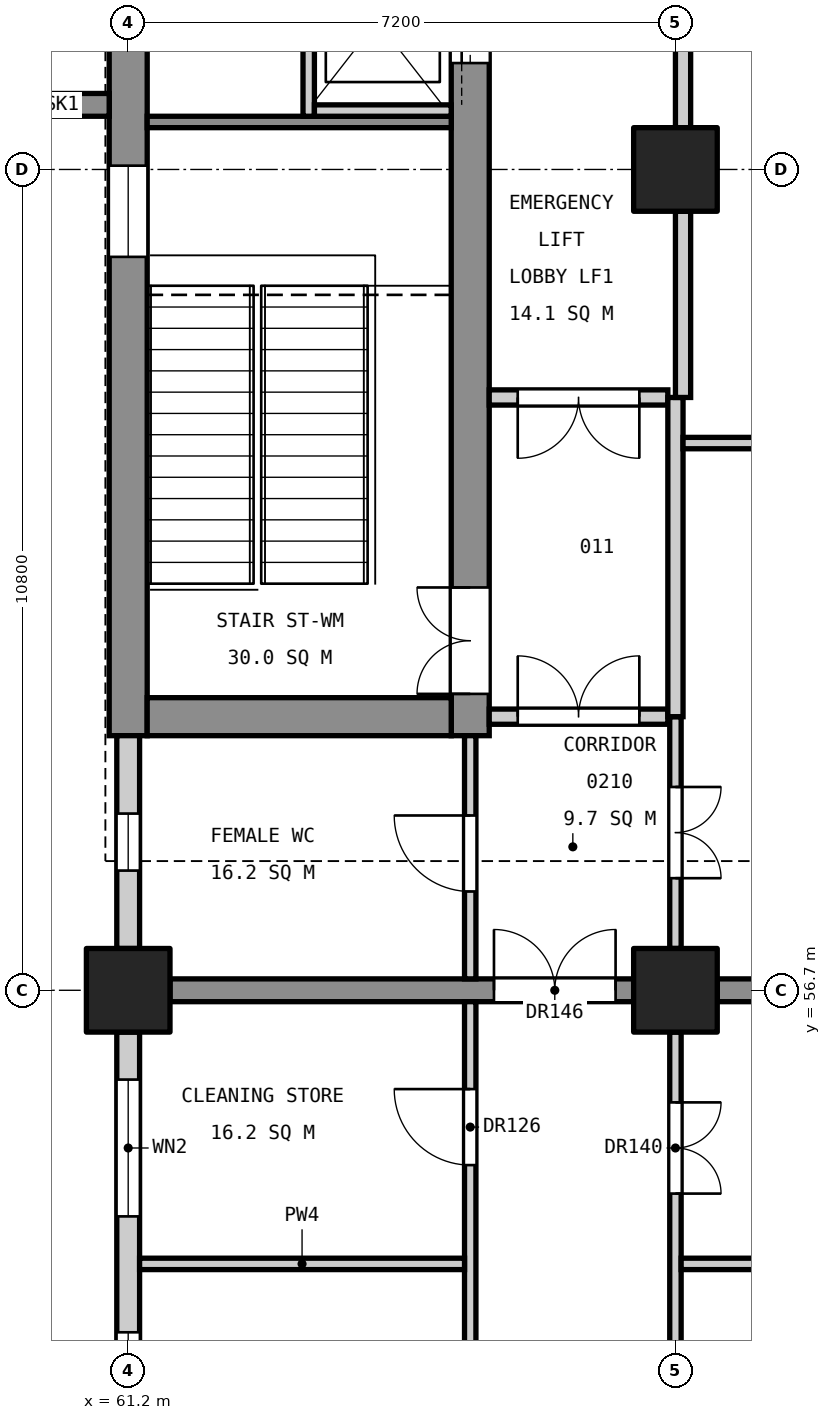
"""IFC4 building model, lengths in metres.
Left out: names, types, materials, properties, quantities, classifications, styles, units other than length and angle.
Written with IfcOpenShell. Run it as: python <this file> out.ifc"""

import sys

from ifc_helpers import new_model, si_unit, direction, frame, frame_2d, origin, origin_2d, place, context, subcontext, project, spatial, rectangle, extrude, element, fill, save


model = new_model("IFC4")
c1 = context("Model", 3, precision=1e-05, world=origin(), true_north=direction((0.0, 1.0)))
c2 = subcontext(c1, "Body", "Model", "MODEL_VIEW")
j1 = project(units=[si_unit("LENGTHUNIT", "METRE"), si_unit("PLANEANGLEUNIT", "RADIAN")], contexts=[c1])
p1 = place(None, origin())
s1 = spatial("IfcSite", under=j1, at=p1, CompositionType="ELEMENT")
p2 = place(p1, origin())
s2 = spatial("IfcBuilding", under=s1, at=p2, CompositionType="ELEMENT")
p3 = place(p2, frame((0.0, 0.0, 11.4)))
s3 = spatial("IfcBuildingStorey", under=s2, at=p3, CompositionType="ELEMENT", Elevation=11.4)
for number, where, z_axis, x_axis in (
    (1, (61.2, 56.7, 0.0), (0.0, 0.0, 1.0), (1.0, 0.0, 0.0)),
    (2, (68.4, 56.7, 0.0), (0.0, 0.0, 1.0), (1.0, 0.0, 0.0)),
    (3, (68.4, 67.5, 0.0), (0.0, 0.0, 1.0), (1.0, 0.0, 0.0)),
):
    element("IfcColumn", number, at=place(p3, frame(where, z_axis=z_axis, x_axis=x_axis)), inside=s3, PredefinedType="COLUMN", context=c2, shape_type="SweptSolid", body=[
        extrude(rectangle(XDim=1.1, YDim=1.1, at=origin_2d()), origin(), (0.0, 0.0, 1.0), 5.4),
    ])
p4 = place(p3, frame((61.2, 60.05, 0.0), z_axis=(0.0, 0.0, 1.0), x_axis=(0.0, 1.0, 0.0)))
e4 = element("IfcWall", 4, at=p4, inside=s3, PredefinedType="SHEAR", context=c2, shape_type="SweptSolid", body=[
    extrude(rectangle(XDim=14.9, YDim=0.5, at=frame_2d((7.45, 0.0))), origin(), (0.0, 0.0, 1.0), 5.1),
])
p5 = place(p4, frame((6.3, 0.0, 3.4)))
e5 = element("IfcOpeningElement", 5, at=p5, cuts=e4, PredefinedType="OPENING", context=c2, shape_type="SweptSolid", body=[
    extrude(rectangle(XDim=1.2, YDim=0.9, at=frame_2d((0.6, 0.45))), frame((0.0, 0.26, 0.0), z_axis=(0.0, -1.0, 0.0), x_axis=(1.0, 0.0, 0.0)), (0.0, 0.0, 1.0), 0.52),
])
p6 = place(p3, frame((65.7, 60.05, 0.0), z_axis=(0.0, 0.0, 1.0), x_axis=(0.0, 1.0, 0.0)))
e6 = element("IfcWall", 6, at=p6, inside=s3, PredefinedType="SHEAR", context=c2, shape_type="SweptSolid", body=[
    extrude(rectangle(XDim=14.9, YDim=0.5, at=frame_2d((7.45, 0.0))), origin(), (0.0, 0.0, 1.0), 5.1),
])
p7 = place(p6, frame((0.55, 0.0, 0.0)))
e7 = element("IfcOpeningElement", 7, at=p7, cuts=e6, PredefinedType="OPENING", context=c2, shape_type="SweptSolid", body=[
    extrude(rectangle(XDim=1.4, YDim=2.1, at=frame_2d((0.7, 1.05))), frame((0.0, 0.26, 0.0), z_axis=(0.0, -1.0, 0.0), x_axis=(1.0, 0.0, 0.0)), (0.0, 0.0, 1.0), 0.52),
])
p8 = place(p6, frame((8.85, 0.0, 0.0)))
e8 = element("IfcOpeningElement", 8, at=p8, cuts=e6, PredefinedType="OPENING", context=c2, shape_type="SweptSolid", body=[
    extrude(rectangle(XDim=1.1, YDim=2.1, at=frame_2d((0.55, 1.05))), frame((0.0, 0.26, 0.0), z_axis=(0.0, -1.0, 0.0), x_axis=(1.0, 0.0, 0.0)), (0.0, 0.0, 1.0), 0.52),
])
p9 = place(p6, frame((11.4, 0.0, 0.0)))
e9 = element("IfcOpeningElement", 9, at=p9, cuts=e6, PredefinedType="OPENING", context=c2, shape_type="SweptSolid", body=[
    extrude(rectangle(XDim=1.1, YDim=2.1, at=frame_2d((0.55, 1.05))), frame((0.0, 0.26, 0.0), z_axis=(0.0, -1.0, 0.0), x_axis=(1.0, 0.0, 0.0)), (0.0, 0.0, 1.0), 0.52),
])
p10 = place(p3, frame((61.45, 60.3, 0.0), z_axis=(0.0, 0.0, 1.0), x_axis=(1.0, 0.0, 0.0)))
e10 = element("IfcWall", 10, at=p10, inside=s3, PredefinedType="SHEAR", context=c2, shape_type="SweptSolid", body=[
    extrude(rectangle(XDim=4.0, YDim=0.5, at=frame_2d((2.0, 0.0))), origin(), (0.0, 0.0, 1.0), 5.1),
])
p11 = place(p3, frame((60.95, 68.35, 0.0), z_axis=(0.0, 0.0, 1.0), x_axis=(-1.0, 0.0, 0.0)))
e11 = element("IfcWall", 11, at=p11, inside=s3, PredefinedType="SHEAR", context=c2, shape_type="SweptSolid", body=[
    extrude(rectangle(XDim=1.25, YDim=0.3, at=frame_2d((0.625, 0.0))), origin(), (0.0, 0.0, 1.0), 5.4),
])
p12 = place(p3, frame((61.75, 56.7, 0.0), z_axis=(0.0, 0.0, 1.0), x_axis=(1.0, 0.0, 0.0)))
e12 = element("IfcWall", 12, at=p12, inside=s3, PredefinedType="SHEAR", context=c2, shape_type="SweptSolid", body=[
    extrude(rectangle(XDim=6.1, YDim=0.3, at=frame_2d((3.05, 0.0))), origin(), (0.0, 0.0, 1.0), 5.1),
])
p13 = place(p12, frame((4.262, 0.0, 0.0)))
e13 = element("IfcOpeningElement", 13, at=p13, cuts=e12, PredefinedType="OPENING", context=c2, shape_type="SweptSolid", body=[
    extrude(rectangle(XDim=1.6, YDim=2.1, at=frame_2d((0.8, 1.05))), frame((0.0, 0.16, 0.0), z_axis=(0.0, -1.0, 0.0), x_axis=(1.0, 0.0, 0.0)), (0.0, 0.0, 1.0), 0.32),
])
p14 = place(p3, frame((68.95, 56.7, 0.0), z_axis=(0.0, 0.0, 1.0), x_axis=(1.0, 0.0, 0.0)))
e14 = element("IfcWall", 14, at=p14, inside=s3, PredefinedType="SHEAR", context=c2, shape_type="SweptSolid", body=[
    extrude(rectangle(XDim=9.7, YDim=0.3, at=frame_2d((4.85, 0.0))), origin(), (0.0, 0.0, 1.0), 5.1),
])
p15 = place(p3, frame((61.45, 68.125, 0.0), z_axis=(0.0, 0.0, 1.0), x_axis=(1.0, 0.0, 0.0)))
e15 = element("IfcWall", 15, at=p15, inside=s3, PredefinedType="SOLIDWALL", context=c2, shape_type="SweptSolid", body=[
    extrude(rectangle(XDim=4.0, YDim=0.15, at=frame_2d((2.0, 0.0))), origin(), (0.0, 0.0, 1.0), 5.1),
])
p16 = place(p3, frame((63.575, 68.2, 0.0), z_axis=(0.0, 0.0, 1.0), x_axis=(0.0, 1.0, 0.0)))
e16 = element("IfcWall", 16, at=p16, inside=s3, PredefinedType="SOLIDWALL", context=c2, shape_type="SweptSolid", body=[
    extrude(rectangle(XDim=2.5, YDim=0.15, at=frame_2d((1.25, 0.0))), origin(), (0.0, 0.0, 1.0), 5.4),
])
p17 = place(p3, frame((63.65, 68.275, 0.0), z_axis=(0.0, 0.0, 1.0), x_axis=(1.0, 0.0, 0.0)))
e17 = element("IfcWall", 17, at=p17, inside=s3, PredefinedType="SOLIDWALL", context=c2, shape_type="SweptSolid", body=[
    extrude(rectangle(XDim=1.8, YDim=0.15, at=frame_2d((0.9, 0.0))), origin(), (0.0, 0.0, 1.0), 5.4),
])
p18 = place(p3, frame((61.2, 46.15, 0.0), z_axis=(0.0, 0.0, 1.0), x_axis=(0.0, 1.0, 0.0)))
e18 = element("IfcWall", 18, at=p18, inside=s3, PredefinedType="STANDARD", context=c2, shape_type="SweptSolid", body=[
    extrude(rectangle(XDim=10.0, YDim=0.3, at=frame_2d((5.0, 0.0))), origin(), (0.0, 0.0, 1.0), 4.1),
])
p19 = place(p18, frame((1.3, 0.0, 0.8)))
e19 = element("IfcOpeningElement", 19, at=p19, cuts=e18, PredefinedType="OPENING", context=c2, shape_type="SweptSolid", body=[
    extrude(rectangle(XDim=0.75, YDim=1.2, at=frame_2d((0.375, 0.6))), frame((0.0, 0.16, 0.0), z_axis=(0.0, -1.0, 0.0), x_axis=(1.0, 0.0, 0.0)), (0.0, 0.0, 1.0), 0.32),
])
p20 = place(p18, frame((4.25, 0.0, 0.9)))
e20 = element("IfcOpeningElement", 20, at=p20, cuts=e18, PredefinedType="OPENING", context=c2, shape_type="SweptSolid", body=[
    extrude(rectangle(XDim=1.8, YDim=3.0, at=frame_2d((0.9, 1.5))), frame((0.0, 0.16, 0.0), z_axis=(0.0, -1.0, 0.0), x_axis=(1.0, 0.0, 0.0)), (0.0, 0.0, 1.0), 0.32),
])
p21 = place(p18, frame((7.575, 0.0, 0.9)))
e21 = element("IfcOpeningElement", 21, at=p21, cuts=e18, PredefinedType="OPENING", context=c2, shape_type="SweptSolid", body=[
    extrude(rectangle(XDim=1.8, YDim=3.0, at=frame_2d((0.9, 1.5))), frame((0.0, 0.16, 0.0), z_axis=(0.0, -1.0, 0.0), x_axis=(1.0, 0.0, 0.0)), (0.0, 0.0, 1.0), 0.32),
])
p22 = place(p3, frame((61.2, 57.25, 0.0), z_axis=(0.0, 0.0, 1.0), x_axis=(0.0, 1.0, 0.0)))
e22 = element("IfcWall", 22, at=p22, inside=s3, PredefinedType="STANDARD", context=c2, shape_type="SweptSolid", body=[
    extrude(rectangle(XDim=2.8, YDim=0.3, at=frame_2d((1.4, 0.0))), origin(), (0.0, 0.0, 1.0), 4.1),
])
p23 = place(p22, frame((1.025, 0.0, 0.8)))
e23 = element("IfcOpeningElement", 23, at=p23, cuts=e22, PredefinedType="OPENING", context=c2, shape_type="SweptSolid", body=[
    extrude(rectangle(XDim=0.75, YDim=1.2, at=frame_2d((0.375, 0.6))), frame((0.0, 0.16, 0.0), z_axis=(0.0, -1.0, 0.0), x_axis=(1.0, 0.0, 0.0)), (0.0, 0.0, 1.0), 0.32),
])
p24 = place(p3, frame((65.7, 46.15, 0.0), z_axis=(0.0, 0.0, 1.0), x_axis=(0.0, 1.0, 0.0)))
e24 = element("IfcWall", 24, at=p24, inside=s3, PredefinedType="PARTITIONING", context=c2, shape_type="SweptSolid", body=[
    extrude(rectangle(XDim=10.4, YDim=0.15, at=frame_2d((5.2, 0.0))), origin(), (0.0, 0.0, 1.0), 4.0),
])
p25 = place(p24, frame((4.65, 0.0, 0.0)))
e25 = element("IfcOpeningElement", 25, at=p25, cuts=e24, PredefinedType="OPENING", context=c2, shape_type="SweptSolid", body=[
    extrude(rectangle(XDim=1.0, YDim=2.1, at=frame_2d((0.5, 1.05))), frame((0.0, 0.085, 0.0), z_axis=(0.0, -1.0, 0.0), x_axis=(1.0, 0.0, 0.0)), (0.0, 0.0, 1.0), 0.17),
])
p26 = place(p24, frame((8.25, 0.0, 0.0)))
e26 = element("IfcOpeningElement", 26, at=p26, cuts=e24, PredefinedType="OPENING", context=c2, shape_type="SweptSolid", body=[
    extrude(rectangle(XDim=1.0, YDim=2.1, at=frame_2d((0.5, 1.05))), frame((0.0, 0.085, 0.0), z_axis=(0.0, -1.0, 0.0), x_axis=(1.0, 0.0, 0.0)), (0.0, 0.0, 1.0), 0.17),
])
p27 = place(p24, frame((1.05, 0.0, 0.0)))
e27 = element("IfcOpeningElement", 27, at=p27, cuts=e24, PredefinedType="OPENING", context=c2, shape_type="SweptSolid", body=[
    extrude(rectangle(XDim=1.0, YDim=2.1, at=frame_2d((0.5, 1.05))), frame((0.0, 0.085, 0.0), z_axis=(0.0, -1.0, 0.0), x_axis=(1.0, 0.0, 0.0)), (0.0, 0.0, 1.0), 0.17),
])
p28 = place(p3, frame((65.7, 56.85, 0.0), z_axis=(0.0, 0.0, 1.0), x_axis=(0.0, 1.0, 0.0)))
e28 = element("IfcWall", 28, at=p28, inside=s3, PredefinedType="PARTITIONING", context=c2, shape_type="SweptSolid", body=[
    extrude(rectangle(XDim=3.2, YDim=0.15, at=frame_2d((1.6, 0.0))), origin(), (0.0, 0.0, 1.0), 4.0),
])
p29 = place(p28, frame((1.15, 0.0, 0.0)))
e29 = element("IfcOpeningElement", 29, at=p29, cuts=e28, PredefinedType="OPENING", context=c2, shape_type="SweptSolid", body=[
    extrude(rectangle(XDim=1.0, YDim=2.1, at=frame_2d((0.5, 1.05))), frame((0.0, 0.085, 0.0), z_axis=(0.0, -1.0, 0.0), x_axis=(1.0, 0.0, 0.0)), (0.0, 0.0, 1.0), 0.17),
])
p30 = place(p3, frame((61.35, 53.1, 0.0), z_axis=(0.0, 0.0, 1.0), x_axis=(1.0, 0.0, 0.0)))
e30 = element("IfcWall", 30, at=p30, inside=s3, PredefinedType="PARTITIONING", context=c2, shape_type="SweptSolid", body=[
    extrude(rectangle(XDim=4.275, YDim=0.15, at=frame_2d((2.137, 0.0))), origin(), (0.0, 0.0, 1.0), 4.3),
])
p31 = place(p3, frame((65.95, 60.3, 0.0), z_axis=(0.0, 0.0, 1.0), x_axis=(1.0, 0.0, 0.0)))
e31 = element("IfcWall", 31, at=p31, inside=s3, PredefinedType="PARTITIONING", context=c2, shape_type="SweptSolid", body=[
    extrude(rectangle(XDim=2.35, YDim=0.2, at=frame_2d((1.175, 0.0))), origin(), (0.0, 0.0, 1.0), 4.3),
])
p32 = place(p31, frame((0.375, 0.0, 0.0)))
e32 = element("IfcOpeningElement", 32, at=p32, cuts=e31, PredefinedType="OPENING", context=c2, shape_type="SweptSolid", body=[
    extrude(rectangle(XDim=1.6, YDim=2.1, at=frame_2d((0.8, 1.05))), frame((0.0, 0.11, 0.0), z_axis=(0.0, -1.0, 0.0), x_axis=(1.0, 0.0, 0.0)), (0.0, 0.0, 1.0), 0.22),
])
p33 = place(p3, frame((65.95, 64.5, 0.0), z_axis=(0.0, 0.0, 1.0), x_axis=(1.0, 0.0, 0.0)))
e33 = element("IfcWall", 33, at=p33, inside=s3, PredefinedType="PARTITIONING", context=c2, shape_type="SweptSolid", body=[
    extrude(rectangle(XDim=2.35, YDim=0.2, at=frame_2d((1.175, 0.0))), origin(), (0.0, 0.0, 1.0), 4.0),
])
p34 = place(p33, frame((0.375, 0.0, 0.0)))
e34 = element("IfcOpeningElement", 34, at=p34, cuts=e33, PredefinedType="OPENING", context=c2, shape_type="SweptSolid", body=[
    extrude(rectangle(XDim=1.6, YDim=2.1, at=frame_2d((0.8, 1.05))), frame((0.0, 0.11, 0.0), z_axis=(0.0, -1.0, 0.0), x_axis=(1.0, 0.0, 0.0)), (0.0, 0.0, 1.0), 0.22),
])
p35 = place(p3, frame((68.4, 46.45, 0.0), z_axis=(0.0, 0.0, 1.0), x_axis=(0.0, 1.0, 0.0)))
e35 = element("IfcWall", 35, at=p35, inside=s3, PredefinedType="PARTITIONING", context=c2, shape_type="SweptSolid", body=[
    extrude(rectangle(XDim=9.7, YDim=0.15, at=frame_2d((4.85, 0.0))), origin(), (0.0, 0.0, 1.0), 4.0),
])
p36 = place(p35, frame((4.25, 0.0, 0.0)))
e36 = element("IfcOpeningElement", 36, at=p36, cuts=e35, PredefinedType="OPENING", context=c2, shape_type="SweptSolid", body=[
    extrude(rectangle(XDim=1.2, YDim=2.1, at=frame_2d((0.6, 1.05))), frame((0.0, 0.085, 0.0), z_axis=(0.0, -1.0, 0.0), x_axis=(1.0, 0.0, 0.0)), (0.0, 0.0, 1.0), 0.17),
])
p37 = place(p35, frame((0.925, 0.0, 0.0)))
e37 = element("IfcOpeningElement", 37, at=p37, cuts=e35, PredefinedType="OPENING", context=c2, shape_type="SweptSolid", body=[
    extrude(rectangle(XDim=1.2, YDim=2.1, at=frame_2d((0.6, 1.05))), frame((0.0, 0.085, 0.0), z_axis=(0.0, -1.0, 0.0), x_axis=(1.0, 0.0, 0.0)), (0.0, 0.0, 1.0), 0.17),
])
p38 = place(p35, frame((7.575, 0.0, 0.0)))
e38 = element("IfcOpeningElement", 38, at=p38, cuts=e35, PredefinedType="OPENING", context=c2, shape_type="SweptSolid", body=[
    extrude(rectangle(XDim=1.2, YDim=2.1, at=frame_2d((0.6, 1.05))), frame((0.0, 0.085, 0.0), z_axis=(0.0, -1.0, 0.0), x_axis=(1.0, 0.0, 0.0)), (0.0, 0.0, 1.0), 0.17),
])
p39 = place(p3, frame((68.4, 57.25, 0.0), z_axis=(0.0, 0.0, 1.0), x_axis=(0.0, 1.0, 0.0)))
e39 = element("IfcWall", 39, at=p39, inside=s3, PredefinedType="PARTITIONING", context=c2, shape_type="SweptSolid", body=[
    extrude(rectangle(XDim=3.05, YDim=0.15, at=frame_2d((1.525, 0.0))), origin(), (0.0, 0.0, 1.0), 4.0),
])
p40 = place(p39, frame((0.925, 0.0, 0.0)))
e40 = element("IfcOpeningElement", 40, at=p40, cuts=e39, PredefinedType="OPENING", context=c2, shape_type="SweptSolid", body=[
    extrude(rectangle(XDim=1.2, YDim=2.1, at=frame_2d((0.6, 1.05))), frame((0.0, 0.085, 0.0), z_axis=(0.0, -1.0, 0.0), x_axis=(1.0, 0.0, 0.0)), (0.0, 0.0, 1.0), 0.17),
])
p41 = place(p3, frame((68.4, 60.3, 0.0), z_axis=(0.0, 0.0, 1.0), x_axis=(0.0, 1.0, 0.0)))
e41 = element("IfcWall", 41, at=p41, inside=s3, PredefinedType="PARTITIONING", context=c2, shape_type="SweptSolid", body=[
    extrude(rectangle(XDim=4.2, YDim=0.2, at=frame_2d((2.1, 0.0))), origin(), (0.0, 0.0, 1.0), 4.0),
])
p42 = place(p3, frame((68.5, 64.5, 0.0), z_axis=(0.0, 0.0, 1.0), x_axis=(0.0, 1.0, 0.0)))
e42 = element("IfcWall", 42, at=p42, inside=s3, PredefinedType="PARTITIONING", context=c2, shape_type="SweptSolid", body=[
    extrude(rectangle(XDim=2.45, YDim=0.2, at=frame_2d((1.225, 0.0))), origin(), (0.0, 0.0, 1.0), 4.0),
])
p43 = place(p3, frame((68.5, 68.05, 0.0), z_axis=(0.0, 0.0, 1.0), x_axis=(0.0, 1.0, 0.0)))
e43 = element("IfcWall", 43, at=p43, inside=s3, PredefinedType="PARTITIONING", context=c2, shape_type="SweptSolid", body=[
    extrude(rectangle(XDim=2.75, YDim=0.2, at=frame_2d((1.375, 0.0))), origin(), (0.0, 0.0, 1.0), 4.0),
])
p44 = place(p3, frame((68.475, 53.1, 0.0), z_axis=(0.0, 0.0, 1.0), x_axis=(1.0, 0.0, 0.0)))
e44 = element("IfcWall", 44, at=p44, inside=s3, PredefinedType="PARTITIONING", context=c2, shape_type="SweptSolid", body=[
    extrude(rectangle(XDim=10.575, YDim=0.15, at=frame_2d((5.288, 0.0))), origin(), (0.0, 0.0, 1.0), 4.3),
])
p45 = place(p3, frame((68.5, 63.9, 0.0), z_axis=(0.0, 0.0, 1.0), x_axis=(1.0, 0.0, 0.0)))
e45 = element("IfcWall", 45, at=p45, inside=s3, PredefinedType="PARTITIONING", context=c2, shape_type="SweptSolid", body=[
    extrude(rectangle(XDim=10.55, YDim=0.15, at=frame_2d((5.275, 0.0))), origin(), (0.0, 0.0, 1.0), 4.3),
])
p46 = place(p7, origin())
e46 = element("IfcDoor", 46, at=p46, inside=s3, OperationType="DOUBLE_DOOR_SINGLE_SWING", PredefinedType="DOOR", context=c2, shape_type="SweptSolid", body=[
    extrude(rectangle(XDim=1.4, YDim=2.1, at=frame_2d((0.7, 1.05))), frame((0.0, 0.025, 0.0), z_axis=(0.0, -1.0, 0.0), x_axis=(1.0, 0.0, 0.0)), (0.0, 0.0, 1.0), 0.05),
])
fill(e7, e46)
p47 = place(p8, origin())
e47 = element("IfcDoor", 47, at=p47, inside=s3, OperationType="SLIDING_TO_LEFT", PredefinedType="DOOR", context=c2, shape_type="SweptSolid", body=[
    extrude(rectangle(XDim=1.1, YDim=2.1, at=frame_2d((0.55, 1.05))), frame((0.0, 0.025, 0.0), z_axis=(0.0, -1.0, 0.0), x_axis=(1.0, 0.0, 0.0)), (0.0, 0.0, 1.0), 0.05),
])
fill(e8, e47)
p48 = place(p20, origin())
e48 = element("IfcWindow", 48, at=p48, inside=s3, PartitioningType="SINGLE_PANEL", PredefinedType="WINDOW", context=c2, shape_type="SweptSolid", body=[
    extrude(rectangle(XDim=1.8, YDim=3.0, at=frame_2d((0.9, 1.5))), frame((0.0, 0.03, 0.0), z_axis=(0.0, -1.0, 0.0), x_axis=(1.0, 0.0, 0.0)), (0.0, 0.0, 1.0), 0.06),
])
fill(e20, e48)
p49 = place(p21, origin())
e49 = element("IfcWindow", 49, at=p49, inside=s3, PartitioningType="SINGLE_PANEL", PredefinedType="WINDOW", context=c2, shape_type="SweptSolid", body=[
    extrude(rectangle(XDim=1.8, YDim=3.0, at=frame_2d((0.9, 1.5))), frame((0.0, 0.03, 0.0), z_axis=(0.0, -1.0, 0.0), x_axis=(1.0, 0.0, 0.0)), (0.0, 0.0, 1.0), 0.06),
])
fill(e21, e49)
p50 = place(p23, origin())
e50 = element("IfcWindow", 50, at=p50, inside=s3, PartitioningType="SINGLE_PANEL", PredefinedType="WINDOW", context=c2, shape_type="SweptSolid", body=[
    extrude(rectangle(XDim=0.75, YDim=1.2, at=frame_2d((0.375, 0.6))), frame((0.0, 0.03, 0.0), z_axis=(0.0, -1.0, 0.0), x_axis=(1.0, 0.0, 0.0)), (0.0, 0.0, 1.0), 0.06),
])
fill(e23, e50)
p51 = place(p5, origin())
e51 = element("IfcWindow", 51, at=p51, inside=s3, PartitioningType="SINGLE_PANEL", PredefinedType="WINDOW", context=c2, shape_type="SweptSolid", body=[
    extrude(rectangle(XDim=1.2, YDim=0.9, at=frame_2d((0.6, 0.45))), frame((0.0, 0.03, 0.0), z_axis=(0.0, -1.0, 0.0), x_axis=(1.0, 0.0, 0.0)), (0.0, 0.0, 1.0), 0.06),
])
fill(e5, e51)
p52 = place(p26, origin())
e52 = element("IfcDoor", 52, at=p52, inside=s3, OperationType="SINGLE_SWING_RIGHT", PredefinedType="DOOR", context=c2, shape_type="SweptSolid", body=[
    extrude(rectangle(XDim=1.0, YDim=2.1, at=frame_2d((0.5, 1.05))), frame((0.0, 0.025, 0.0), z_axis=(0.0, -1.0, 0.0), x_axis=(1.0, 0.0, 0.0)), (0.0, 0.0, 1.0), 0.05),
])
fill(e26, e52)
p53 = place(p29, origin())
e53 = element("IfcDoor", 53, at=p53, inside=s3, OperationType="SINGLE_SWING_RIGHT", PredefinedType="DOOR", context=c2, shape_type="SweptSolid", body=[
    extrude(rectangle(XDim=1.0, YDim=2.1, at=frame_2d((0.5, 1.05))), frame((0.0, 0.025, 0.0), z_axis=(0.0, -1.0, 0.0), x_axis=(1.0, 0.0, 0.0)), (0.0, 0.0, 1.0), 0.05),
])
fill(e29, e53)
p54 = place(p40, frame((1.2, 0.0, 0.0), z_axis=(0.0, 0.0, 1.0), x_axis=(-1.0, 0.0, 0.0)))
e54 = element("IfcDoor", 54, at=p54, inside=s3, OperationType="DOUBLE_DOOR_SINGLE_SWING", PredefinedType="DOOR", context=c2, shape_type="SweptSolid", body=[
    extrude(rectangle(XDim=1.2, YDim=2.1, at=frame_2d((0.6, 1.05))), frame((0.0, 0.025, 0.0), z_axis=(0.0, -1.0, 0.0), x_axis=(1.0, 0.0, 0.0)), (0.0, 0.0, 1.0), 0.05),
])
fill(e40, e54)
p55 = place(p38, frame((1.2, 0.0, 0.0), z_axis=(0.0, 0.0, 1.0), x_axis=(-1.0, 0.0, 0.0)))
e55 = element("IfcDoor", 55, at=p55, inside=s3, OperationType="DOUBLE_DOOR_SINGLE_SWING", PredefinedType="DOOR", context=c2, shape_type="SweptSolid", body=[
    extrude(rectangle(XDim=1.2, YDim=2.1, at=frame_2d((0.6, 1.05))), frame((0.0, 0.025, 0.0), z_axis=(0.0, -1.0, 0.0), x_axis=(1.0, 0.0, 0.0)), (0.0, 0.0, 1.0), 0.05),
])
fill(e38, e55)
p56 = place(p32, origin())
e56 = element("IfcDoor", 56, at=p56, inside=s3, OperationType="DOUBLE_DOOR_SINGLE_SWING", PredefinedType="DOOR", context=c2, shape_type="SweptSolid", body=[
    extrude(rectangle(XDim=1.6, YDim=2.1, at=frame_2d((0.8, 1.05))), frame((0.0, 0.025, 0.0), z_axis=(0.0, -1.0, 0.0), x_axis=(1.0, 0.0, 0.0)), (0.0, 0.0, 1.0), 0.05),
])
fill(e32, e56)
p57 = place(p34, frame((1.6, 0.0, 0.0), z_axis=(0.0, 0.0, 1.0), x_axis=(-1.0, 0.0, 0.0)))
e57 = element("IfcDoor", 57, at=p57, inside=s3, OperationType="DOUBLE_DOOR_SINGLE_SWING", PredefinedType="DOOR", context=c2, shape_type="SweptSolid", body=[
    extrude(rectangle(XDim=1.6, YDim=2.1, at=frame_2d((0.8, 1.05))), frame((0.0, 0.025, 0.0), z_axis=(0.0, -1.0, 0.0), x_axis=(1.0, 0.0, 0.0)), (0.0, 0.0, 1.0), 0.05),
])
fill(e34, e57)
p58 = place(p13, origin())
e58 = element("IfcDoor", 58, at=p58, inside=s3, OperationType="DOUBLE_DOOR_SINGLE_SWING", PredefinedType="DOOR", context=c2, shape_type="SweptSolid", body=[
    extrude(rectangle(XDim=1.6, YDim=2.1, at=frame_2d((0.8, 1.05))), frame((0.0, 0.025, 0.0), z_axis=(0.0, -1.0, 0.0), x_axis=(1.0, 0.0, 0.0)), (0.0, 0.0, 1.0), 0.05),
])
fill(e13, e58)
save(model, sys.argv[1])
